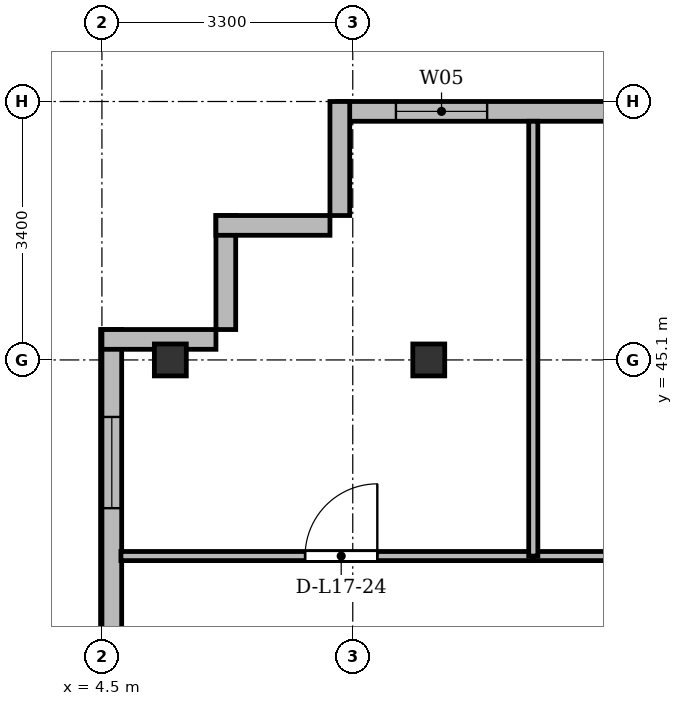
"""IFC4 building model, lengths in metres.
Left out: names, types, materials, properties, quantities, classifications, styles, units other than length and angle.
Written with IfcOpenShell. Run it as: python <this file> out.ifc"""

import sys

from ifc_helpers import new_model, si_unit, direction, frame, frame_2d, origin, origin_2d, place, context, subcontext, project, spatial, rectangle, i_section, extrude, source, transform, mapped, element, fill, save


model = new_model("IFC4")
c1 = context("Model", 3, precision=1e-05, world=origin(), true_north=direction((0.0, 1.0)))
c2 = subcontext(c1, "Body", "Model", "MODEL_VIEW")
j1 = project(units=[si_unit("LENGTHUNIT", "METRE"), si_unit("PLANEANGLEUNIT", "RADIAN")], contexts=[c1])
p1 = place(None, origin())
s1 = spatial("IfcSite", under=j1, at=p1, CompositionType="ELEMENT")
p2 = place(p1, origin())
s2 = spatial("IfcBuilding", under=s1, at=p2, CompositionType="ELEMENT")
p3 = place(p2, frame((0.0, 0.0, 66.7)))
s3 = spatial("IfcBuildingStorey", under=s2, at=p3, CompositionType="ELEMENT", Elevation=66.7)
m1 = source(origin(), c2, "Body", "SweptSolid", [
    extrude(i_section(OverallWidth=0.42, OverallDepth=0.42, WebThickness=0.026, FlangeThickness=0.04, at=origin_2d()), origin(), (0.0, 0.0, 1.0), 3.6),
])
for number, where, z_axis, x_axis in (
    (1, (5.4, 45.1, 0.0), (0.0, 0.0, 1.0), (1.0, 0.0, 0.0)),
    (2, (8.8, 45.1, 0.0), (0.0, 0.0, 1.0), (1.0, 0.0, 0.0)),
):
    element("IfcColumn", number, at=place(p3, frame(where, z_axis=z_axis, x_axis=x_axis)), inside=s3, PredefinedType="COLUMN", context=c2, shape_type="MappedRepresentation", body=[
        mapped(m1, transform((0.0, 0.0, 0.0), x_axis=(1.0, 0.0, 0.0), y_axis=(0.0, 1.0, 0.0), z_axis=(0.0, 0.0, 1.0), scale=1.0)),
    ])
p4 = place(p3, frame((7.6, 48.37, 0.0), z_axis=(0.0, 0.0, 1.0), x_axis=(1.0, 0.0, 0.0)))
e3 = element("IfcWall", 3, at=p4, inside=s3, PredefinedType="SOLIDWALL", context=c2, shape_type="SweptSolid", body=[
    extrude(rectangle(XDim=8.0, YDim=0.26, at=frame_2d((4.0, 0.0))), origin(), (0.0, 0.0, 1.0), 3.34),
])
p5 = place(p4, frame((0.768, 0.0, 0.9)))
e4 = element("IfcOpeningElement", 4, at=p5, cuts=e3, PredefinedType="OPENING", context=c2, shape_type="SweptSolid", body=[
    extrude(rectangle(XDim=1.2, YDim=1.65, at=frame_2d((0.6, 0.825))), frame((0.0, 0.14, 0.0), z_axis=(0.0, -1.0, 0.0), x_axis=(1.0, 0.0, 0.0)), (0.0, 0.0, 1.0), 0.28),
])
p6 = place(p4, frame((4.441, 0.0, 0.9)))
e5 = element("IfcOpeningElement", 5, at=p6, cuts=e3, PredefinedType="OPENING", context=c2, shape_type="SweptSolid", body=[
    extrude(rectangle(XDim=1.35, YDim=1.5, at=frame_2d((0.675, 0.75))), frame((0.0, 0.14, 0.0), z_axis=(0.0, -1.0, 0.0), x_axis=(1.0, 0.0, 0.0)), (0.0, 0.0, 1.0), 0.28),
])
p7 = place(p3, frame((4.63, 5.9, 0.0), z_axis=(0.0, 0.0, 1.0), x_axis=(0.0, 1.0, 0.0)))
e6 = element("IfcWall", 6, at=p7, inside=s3, PredefinedType="SOLIDWALL", context=c2, shape_type="SweptSolid", body=[
    extrude(rectangle(XDim=39.6, YDim=0.26, at=frame_2d((19.8, 0.0))), origin(), (0.0, 0.0, 1.0), 3.34),
])
p8 = place(p7, frame((1.45, 0.0, 0.92)))
e7 = element("IfcOpeningElement", 7, at=p8, cuts=e6, PredefinedType="OPENING", context=c2, shape_type="SweptSolid", body=[
    extrude(rectangle(XDim=1.2, YDim=1.65, at=frame_2d((0.6, 0.825))), frame((0.0, 0.14, 0.0), z_axis=(0.0, -1.0, 0.0), x_axis=(1.0, 0.0, 0.0)), (0.0, 0.0, 1.0), 0.28),
])
p9 = place(p7, frame((4.3, 0.0, 0.92)))
e8 = element("IfcOpeningElement", 8, at=p9, cuts=e6, PredefinedType="OPENING", context=c2, shape_type="SweptSolid", body=[
    extrude(rectangle(XDim=2.4, YDim=2.1, at=frame_2d((1.2, 1.05))), frame((0.0, 0.14, 0.0), z_axis=(0.0, -1.0, 0.0), x_axis=(1.0, 0.0, 0.0)), (0.0, 0.0, 1.0), 0.28),
])
p10 = place(p7, frame((8.5, 0.0, 0.92)))
e9 = element("IfcOpeningElement", 9, at=p10, cuts=e6, PredefinedType="OPENING", context=c2, shape_type="SweptSolid", body=[
    extrude(rectangle(XDim=2.4, YDim=2.1, at=frame_2d((1.2, 1.05))), frame((0.0, 0.14, 0.0), z_axis=(0.0, -1.0, 0.0), x_axis=(1.0, 0.0, 0.0)), (0.0, 0.0, 1.0), 0.28),
])
p11 = place(p7, frame((33.9, 0.0, 0.92)))
e10 = element("IfcOpeningElement", 10, at=p11, cuts=e6, PredefinedType="OPENING", context=c2, shape_type="SweptSolid", body=[
    extrude(rectangle(XDim=1.2, YDim=1.65, at=frame_2d((0.6, 0.825))), frame((0.0, 0.14, 0.0), z_axis=(0.0, -1.0, 0.0), x_axis=(1.0, 0.0, 0.0)), (0.0, 0.0, 1.0), 0.28),
])
p12 = place(p7, frame((37.25, 0.0, 0.92)))
e11 = element("IfcOpeningElement", 11, at=p12, cuts=e6, PredefinedType="OPENING", context=c2, shape_type="SweptSolid", body=[
    extrude(rectangle(XDim=1.2, YDim=1.65, at=frame_2d((0.6, 0.825))), frame((0.0, 0.14, 0.0), z_axis=(0.0, -1.0, 0.0), x_axis=(1.0, 0.0, 0.0)), (0.0, 0.0, 1.0), 0.28),
])
p13 = place(p3, frame((4.5, 45.37, 0.0), z_axis=(0.0, 0.0, 1.0), x_axis=(1.0, 0.0, 0.0)))
e12 = element("IfcWall", 12, at=p13, inside=s3, PredefinedType="SOLIDWALL", context=c2, shape_type="SweptSolid", body=[
    extrude(rectangle(XDim=1.5, YDim=0.26, at=frame_2d((0.75, 0.0))), origin(), (0.0, 0.0, 1.0), 2.69),
])
for number, where, z_axis, x_axis in (
    (13, (6.13, 45.5, 0.0), (0.0, 0.0, 1.0), (0.0, 1.0, 0.0)),
    (14, (6.0, 46.87, 0.0), (0.0, 0.0, 1.0), (1.0, 0.0, 0.0)),
    (15, (7.63, 47.0, 0.0), (0.0, 0.0, 1.0), (0.0, 1.0, 0.0)),
):
    element("IfcWall", number, at=place(p3, frame(where, z_axis=z_axis, x_axis=x_axis)), inside=s3, PredefinedType="SOLIDWALL", context=c2, shape_type="SweptSolid", body=[
        extrude(rectangle(XDim=1.5, YDim=0.26, at=frame_2d((0.75, 0.0))), origin(), (0.0, 0.0, 1.0), 3.34),
    ])
p14 = place(p3, frame((4.75, 42.52, 0.0), z_axis=(0.0, 0.0, 1.0), x_axis=(1.0, 0.0, 0.0)))
e16 = element("IfcWall", 16, at=p14, inside=s3, PredefinedType="PARTITIONING", context=c2, shape_type="SweptSolid", body=[
    extrude(rectangle(XDim=5.425, YDim=0.12, at=frame_2d((2.712, 0.0))), origin(), (0.0, 0.0, 1.0), 2.752),
])
p15 = place(p14, frame((2.423, 0.0, 0.0)))
e17 = element("IfcOpeningElement", 17, at=p15, cuts=e16, PredefinedType="OPENING", context=c2, shape_type="SweptSolid", body=[
    extrude(rectangle(XDim=0.95, YDim=2.15, at=frame_2d((0.475, 1.075))), frame((0.0, 0.07, 0.0), z_axis=(0.0, -1.0, 0.0), x_axis=(1.0, 0.0, 0.0)), (0.0, 0.0, 1.0), 0.14),
])
p16 = place(p3, frame((10.175, 42.52, 0.0), z_axis=(0.0, 0.0, 1.0), x_axis=(1.0, 0.0, 0.0)))
e18 = element("IfcWall", 18, at=p16, inside=s3, PredefinedType="PARTITIONING", context=c2, shape_type="SweptSolid", body=[
    extrude(rectangle(XDim=5.425, YDim=0.12, at=frame_2d((2.712, 0.0))), origin(), (0.0, 0.0, 1.0), 2.752),
])
p17 = place(p16, frame((2.052, 0.0, 0.0)))
e19 = element("IfcOpeningElement", 19, at=p17, cuts=e18, PredefinedType="OPENING", context=c2, shape_type="SweptSolid", body=[
    extrude(rectangle(XDim=0.95, YDim=2.15, at=frame_2d((0.475, 1.075))), frame((0.0, 0.07, 0.0), z_axis=(0.0, -1.0, 0.0), x_axis=(1.0, 0.0, 0.0)), (0.0, 0.0, 1.0), 0.14),
])
p18 = place(p3, frame((10.175, 42.52, 0.0), z_axis=(0.0, 0.0, 1.0), x_axis=(0.0, 1.0, 0.0)))
e20 = element("IfcWall", 20, at=p18, inside=s3, PredefinedType="PARTITIONING", context=c2, shape_type="SweptSolid", body=[
    extrude(rectangle(XDim=5.72, YDim=0.12, at=frame_2d((2.86, 0.0))), origin(), (0.0, 0.0, 1.0), 2.69),
])
m2 = source(origin(), c2, "Body", "SweptSolid", [
    extrude(rectangle(XDim=1.2, YDim=1.65, at=frame_2d((0.6, 0.825))), frame((0.0, 0.03, 0.0), z_axis=(0.0, -1.0, 0.0), x_axis=(1.0, 0.0, 0.0)), (0.0, 0.0, 1.0), 0.06),
])
p19 = place(p5, origin())
e21 = element("IfcWindow", 21, at=p19, inside=s3, PartitioningType="SINGLE_PANEL", PredefinedType="WINDOW", context=c2, shape_type="MappedRepresentation", body=[
    mapped(m2, transform((0.0, 0.0, 0.0), x_axis=(1.0, 0.0, 0.0), y_axis=(0.0, 1.0, 0.0), z_axis=(0.0, 0.0, 1.0), scale=1.0)),
])
fill(e4, e21)
p20 = place(p12, origin())
e22 = element("IfcWindow", 22, at=p20, inside=s3, PartitioningType="SINGLE_PANEL", PredefinedType="WINDOW", context=c2, shape_type="MappedRepresentation", body=[
    mapped(m2, transform((0.0, 0.0, 0.0), x_axis=(1.0, 0.0, 0.0), y_axis=(0.0, 1.0, 0.0), z_axis=(0.0, 0.0, 1.0), scale=1.0)),
])
fill(e11, e22)
m3 = source(origin(), c2, "Body", "SweptSolid", [
    extrude(rectangle(XDim=0.95, YDim=2.15, at=frame_2d((0.475, 1.075))), frame((0.0, 0.025, 0.0), z_axis=(0.0, -1.0, 0.0), x_axis=(1.0, 0.0, 0.0)), (0.0, 0.0, 1.0), 0.05),
])
p21 = place(p15, origin())
e23 = element("IfcDoor", 23, at=p21, inside=s3, OperationType="SINGLE_SWING_RIGHT", PredefinedType="DOOR", context=c2, shape_type="MappedRepresentation", body=[
    mapped(m3, transform((0.0, 0.0, 0.0), x_axis=(1.0, 0.0, 0.0), y_axis=(0.0, 1.0, 0.0), z_axis=(0.0, 0.0, 1.0), scale=1.0)),
])
fill(e17, e23)
save(model, sys.argv[1])
